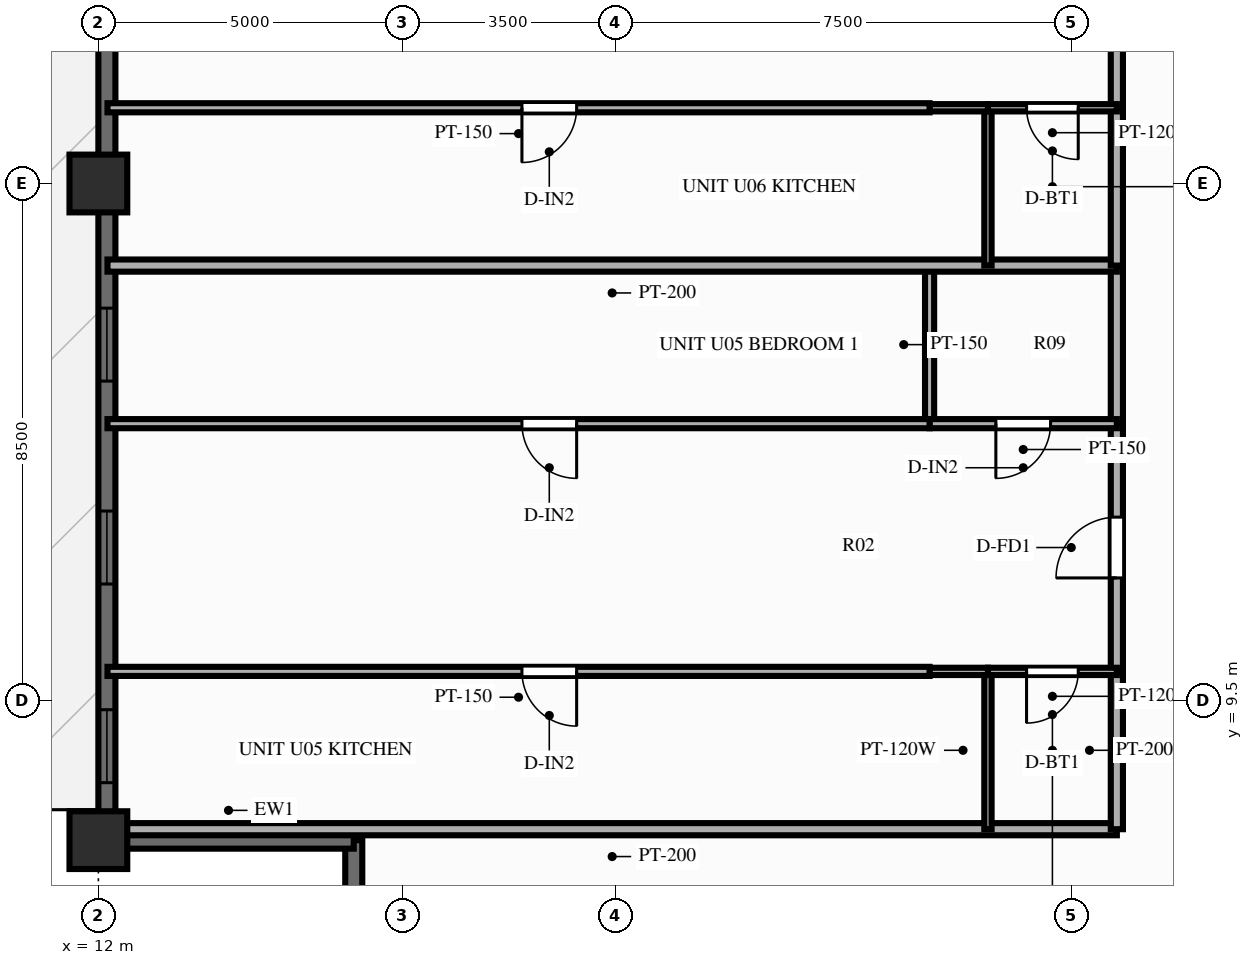
"""IFC4 building model, lengths in metres.
Left out: names, types, materials, properties, quantities, classifications, styles, units other than length and angle.
Written with IfcOpenShell. Run it as: python <this file> out.ifc"""

import sys

from ifc_helpers import new_model, si_unit, direction, frame, frame_2d, origin, origin_2d, place, context, subcontext, project, spatial, rectangle, extrude, source, transform, mapped, element, fill, save


model = new_model("IFC4")
c1 = context("Model", 3, precision=1e-05, world=origin(), true_north=direction((0.0, 1.0)))
c2 = subcontext(c1, "Body", "Model", "MODEL_VIEW")
j1 = project(units=[si_unit("LENGTHUNIT", "METRE"), si_unit("PLANEANGLEUNIT", "RADIAN")], contexts=[c1])
p1 = place(None, origin())
s1 = spatial("IfcSite", under=j1, at=p1, CompositionType="ELEMENT")
p2 = place(p1, origin())
s2 = spatial("IfcBuilding", under=s1, at=p2, CompositionType="ELEMENT")
p3 = place(p2, frame((0.0, 0.0, 119.85)))
s3 = spatial("IfcBuildingStorey", under=s2, at=p3, CompositionType="ELEMENT", Elevation=119.85)
m1 = source(origin(), c2, "Body", "SweptSolid", [
    extrude(rectangle(XDim=0.95, YDim=0.95, at=origin_2d()), origin(), (0.0, 0.0, 1.0), 3.0),
])
for number, where, z_axis, x_axis in (
    (1, (12.0, 18.0, 0.0), (0.0, 0.0, 1.0), (1.0, 0.0, 0.0)),
    (2, (12.0, 7.2, 0.0), (0.0, 0.0, 1.0), (1.0, 0.0, 0.0)),
):
    element("IfcColumn", number, at=place(p3, frame(where, z_axis=z_axis, x_axis=x_axis)), inside=s3, PredefinedType="COLUMN", context=c2, shape_type="MappedRepresentation", body=[
        mapped(m1, transform((0.0, 0.0, 0.0), scale=1.0)),
    ])
p4 = place(p3, frame((12.14, 7.2, 0.0), z_axis=(0.0, 0.0, 1.0), x_axis=(0.0, 1.0, 0.0)))
e3 = element("IfcWall", 3, at=p4, inside=s3, PredefinedType="SOLIDWALL", context=c2, shape_type="SweptSolid", body=[
    extrude(rectangle(XDim=39.6, YDim=0.28, at=frame_2d((19.8, 0.0))), origin(), (0.0, 0.0, 1.0), 2.28),
])
p5 = place(p4, frame((0.945, 0.0, 0.25)))
e4 = element("IfcOpeningElement", 4, at=p5, cuts=e3, PredefinedType="OPENING", context=c2, shape_type="SweptSolid", body=[
    extrude(rectangle(XDim=1.2, YDim=1.5, at=frame_2d((0.6, 0.75))), frame((0.0, 0.152, 0.0), z_axis=(0.0, -1.0, 0.0), x_axis=(1.0, 0.0, 0.0)), (0.0, 0.0, 1.0), 0.304),
])
p6 = place(p4, frame((4.213, 0.0, 0.25)))
e5 = element("IfcOpeningElement", 5, at=p6, cuts=e3, PredefinedType="OPENING", context=c2, shape_type="SweptSolid", body=[
    extrude(rectangle(XDim=1.2, YDim=1.5, at=frame_2d((0.6, 0.75))), frame((0.0, 0.152, 0.0), z_axis=(0.0, -1.0, 0.0), x_axis=(1.0, 0.0, 0.0)), (0.0, 0.0, 1.0), 0.304),
])
p7 = place(p4, frame((7.55, 0.0, 0.25)))
e6 = element("IfcOpeningElement", 6, at=p7, cuts=e3, PredefinedType="OPENING", context=c2, shape_type="SweptSolid", body=[
    extrude(rectangle(XDim=1.2, YDim=1.5, at=frame_2d((0.6, 0.75))), frame((0.0, 0.152, 0.0), z_axis=(0.0, -1.0, 0.0), x_axis=(1.0, 0.0, 0.0)), (0.0, 0.0, 1.0), 0.304),
])
p8 = place(p4, frame((13.483, 0.0, 0.25)))
e7 = element("IfcOpeningElement", 7, at=p8, cuts=e3, PredefinedType="OPENING", context=c2, shape_type="SweptSolid", body=[
    extrude(rectangle(XDim=1.2, YDim=1.5, at=frame_2d((0.6, 0.75))), frame((0.0, 0.152, 0.0), z_axis=(0.0, -1.0, 0.0), x_axis=(1.0, 0.0, 0.0)), (0.0, 0.0, 1.0), 0.304),
])
p9 = place(p4, frame((16.82, 0.0, 0.25)))
e8 = element("IfcOpeningElement", 8, at=p9, cuts=e3, PredefinedType="OPENING", context=c2, shape_type="SweptSolid", body=[
    extrude(rectangle(XDim=1.2, YDim=1.5, at=frame_2d((0.6, 0.75))), frame((0.0, 0.152, 0.0), z_axis=(0.0, -1.0, 0.0), x_axis=(1.0, 0.0, 0.0)), (0.0, 0.0, 1.0), 0.304),
])
p10 = place(p4, frame((19.2, 0.0, 0.25)))
e9 = element("IfcOpeningElement", 9, at=p10, cuts=e3, PredefinedType="OPENING", context=c2, shape_type="SweptSolid", body=[
    extrude(rectangle(XDim=1.2, YDim=1.5, at=frame_2d((0.6, 0.75))), frame((0.0, 0.152, 0.0), z_axis=(0.0, -1.0, 0.0), x_axis=(1.0, 0.0, 0.0)), (0.0, 0.0, 1.0), 0.304),
])
p11 = place(p4, frame((21.992, 0.0, 0.0)))
e10 = element("IfcOpeningElement", 10, at=p11, cuts=e3, PredefinedType="OPENING", context=c2, shape_type="SweptSolid", body=[
    extrude(rectangle(XDim=1.6, YDim=2.15, at=frame_2d((0.8, 1.075))), frame((0.0, 0.152, 0.0), z_axis=(0.0, -1.0, 0.0), x_axis=(1.0, 0.0, 0.0)), (0.0, 0.0, 1.0), 0.304),
])
p12 = place(p4, frame((25.529, 0.0, 0.25)))
e11 = element("IfcOpeningElement", 11, at=p12, cuts=e3, PredefinedType="OPENING", context=c2, shape_type="SweptSolid", body=[
    extrude(rectangle(XDim=1.2, YDim=1.5, at=frame_2d((0.6, 0.75))), frame((0.0, 0.152, 0.0), z_axis=(0.0, -1.0, 0.0), x_axis=(1.0, 0.0, 0.0)), (0.0, 0.0, 1.0), 0.304),
])
p13 = place(p4, frame((29.349, 0.0, 0.25)))
e12 = element("IfcOpeningElement", 12, at=p13, cuts=e3, PredefinedType="OPENING", context=c2, shape_type="SweptSolid", body=[
    extrude(rectangle(XDim=0.7, YDim=1.5, at=frame_2d((0.35, 0.75))), frame((0.0, 0.152, 0.0), z_axis=(0.0, -1.0, 0.0), x_axis=(1.0, 0.0, 0.0)), (0.0, 0.0, 1.0), 0.304),
])
p14 = place(p4, frame((31.285, 0.0, 0.25)))
e13 = element("IfcOpeningElement", 13, at=p14, cuts=e3, PredefinedType="OPENING", context=c2, shape_type="SweptSolid", body=[
    extrude(rectangle(XDim=1.2, YDim=1.5, at=frame_2d((0.6, 0.75))), frame((0.0, 0.152, 0.0), z_axis=(0.0, -1.0, 0.0), x_axis=(1.0, 0.0, 0.0)), (0.0, 0.0, 1.0), 0.304),
])
p15 = place(p4, frame((34.252, 0.0, 0.25)))
e14 = element("IfcOpeningElement", 14, at=p15, cuts=e3, PredefinedType="OPENING", context=c2, shape_type="SweptSolid", body=[
    extrude(rectangle(XDim=1.2, YDim=1.5, at=frame_2d((0.6, 0.75))), frame((0.0, 0.152, 0.0), z_axis=(0.0, -1.0, 0.0), x_axis=(1.0, 0.0, 0.0)), (0.0, 0.0, 1.0), 0.304),
])
p16 = place(p4, frame((37.151, 0.0, 0.25)))
e15 = element("IfcOpeningElement", 15, at=p16, cuts=e3, PredefinedType="OPENING", context=c2, shape_type="SweptSolid", body=[
    extrude(rectangle(XDim=1.2, YDim=1.5, at=frame_2d((0.6, 0.75))), frame((0.0, 0.152, 0.0), z_axis=(0.0, -1.0, 0.0), x_axis=(1.0, 0.0, 0.0)), (0.0, 0.0, 1.0), 0.304),
])
for number, where, z_axis, x_axis in (
    (16, (16.2, 3.08, 0.0), (0.0, 0.0, 1.0), (0.0, 1.0, 0.0)),
    (17, (12.08, 7.2, 0.0), (0.0, 0.0, 1.0), (1.0, 0.0, 0.0)),
):
    element("IfcWall", number, at=place(p3, frame(where, z_axis=z_axis, x_axis=x_axis)), inside=s3, PredefinedType="SOLIDWALL", context=c2, shape_type="SweptSolid", body=[
        extrude(rectangle(XDim=4.12, YDim=0.28, at=frame_2d((2.06, 0.0))), origin(), (0.0, 0.0, 1.0), 2.28),
    ])
p17 = place(p3, frame((28.75, 7.38, 0.0), z_axis=(0.0, 0.0, 1.0), x_axis=(-1.0, 0.0, 0.0)))
e18 = element("IfcWall", 18, at=p17, inside=s3, PredefinedType="PARTITIONING", context=c2, shape_type="SweptSolid", body=[
    extrude(rectangle(XDim=16.6, YDim=0.2, at=frame_2d((8.3, 0.0))), origin(), (0.0, 0.0, 1.0), 2.79),
])
p18 = place(p3, frame((28.75, 7.38, 0.0), z_axis=(0.0, 0.0, 1.0), x_axis=(0.0, 1.0, 0.0)))
e19 = element("IfcWall", 19, at=p18, inside=s3, PredefinedType="PARTITIONING", context=c2, shape_type="SweptSolid", body=[
    extrude(rectangle(XDim=2.596, YDim=0.2, at=frame_2d((1.298, 0.0))), origin(), (0.0, 0.0, 1.0), 2.79),
])
p19 = place(p3, frame((28.75, 9.976, 0.0), z_axis=(0.0, 0.0, 1.0), x_axis=(0.0, 1.0, 0.0)))
e20 = element("IfcWall", 20, at=p19, inside=s3, PredefinedType="PARTITIONING", context=c2, shape_type="SweptSolid", body=[
    extrude(rectangle(XDim=4.074, YDim=0.2, at=frame_2d((2.037, 0.0))), origin(), (0.0, 0.0, 1.0), 2.79),
])
p20 = place(p19, frame((1.537, 0.0, 0.0)))
e21 = element("IfcOpeningElement", 21, at=p20, cuts=e20, PredefinedType="OPENING", context=c2, shape_type="SweptSolid", body=[
    extrude(rectangle(XDim=1.0, YDim=2.15, at=frame_2d((0.5, 1.075))), frame((0.0, 0.112, 0.0), z_axis=(0.0, -1.0, 0.0), x_axis=(1.0, 0.0, 0.0)), (0.0, 0.0, 1.0), 0.224),
])
p21 = place(p3, frame((28.75, 14.05, 0.0), z_axis=(0.0, 0.0, 1.0), x_axis=(0.0, 1.0, 0.0)))
e22 = element("IfcWall", 22, at=p21, inside=s3, PredefinedType="PARTITIONING", context=c2, shape_type="SweptSolid", body=[
    extrude(rectangle(XDim=2.6, YDim=0.2, at=frame_2d((1.3, 0.0))), origin(), (0.0, 0.0, 1.0), 2.79),
])
p22 = place(p3, frame((26.63, 7.38, 0.0), z_axis=(0.0, 0.0, 1.0), x_axis=(0.0, 1.0, 0.0)))
e23 = element("IfcWall", 23, at=p22, inside=s3, PredefinedType="PARTITIONING", context=c2, shape_type="SweptSolid", body=[
    extrude(rectangle(XDim=2.596, YDim=0.12, at=frame_2d((1.298, 0.0))), origin(), (0.0, 0.0, 1.0), 2.79),
])
p23 = place(p3, frame((25.67, 14.05, 0.0), z_axis=(0.0, 0.0, 1.0), x_axis=(0.0, 1.0, 0.0)))
e24 = element("IfcWall", 24, at=p23, inside=s3, PredefinedType="PARTITIONING", context=c2, shape_type="SweptSolid", body=[
    extrude(rectangle(XDim=2.6, YDim=0.15, at=frame_2d((1.3, 0.0))), origin(), (0.0, 0.0, 1.0), 2.79),
])
p24 = place(p3, frame((28.75, 9.976, 0.0), z_axis=(0.0, 0.0, 1.0), x_axis=(-1.0, 0.0, 0.0)))
e25 = element("IfcWall", 25, at=p24, inside=s3, PredefinedType="PARTITIONING", context=c2, shape_type="SweptSolid", body=[
    extrude(rectangle(XDim=2.12, YDim=0.12, at=frame_2d((1.06, 0.0))), origin(), (0.0, 0.0, 1.0), 2.79),
])
p25 = place(p24, frame((0.635, 0.0, 0.0)))
e26 = element("IfcOpeningElement", 26, at=p25, cuts=e25, PredefinedType="OPENING", context=c2, shape_type="SweptSolid", body=[
    extrude(rectangle(XDim=0.85, YDim=2.05, at=frame_2d((0.425, 1.025))), frame((0.0, 0.072, 0.0), z_axis=(0.0, -1.0, 0.0), x_axis=(1.0, 0.0, 0.0)), (0.0, 0.0, 1.0), 0.144),
])
p26 = place(p3, frame((26.63, 9.976, 0.0), z_axis=(0.0, 0.0, 1.0), x_axis=(-1.0, 0.0, 0.0)))
e27 = element("IfcWall", 27, at=p26, inside=s3, PredefinedType="PARTITIONING", context=c2, shape_type="SweptSolid", body=[
    extrude(rectangle(XDim=0.96, YDim=0.12, at=frame_2d((0.48, 0.0))), origin(), (0.0, 0.0, 1.0), 2.79),
])
p27 = place(p3, frame((25.67, 9.976, 0.0), z_axis=(0.0, 0.0, 1.0), x_axis=(-1.0, 0.0, 0.0)))
e28 = element("IfcWall", 28, at=p27, inside=s3, PredefinedType="PARTITIONING", context=c2, shape_type="SweptSolid", body=[
    extrude(rectangle(XDim=13.52, YDim=0.15, at=frame_2d((6.76, 0.0))), origin(), (0.0, 0.0, 1.0), 2.79),
])
p28 = place(p27, frame((5.804, 0.0, 0.0)))
e29 = element("IfcOpeningElement", 29, at=p28, cuts=e28, PredefinedType="OPENING", context=c2, shape_type="SweptSolid", body=[
    extrude(rectangle(XDim=0.9, YDim=2.1, at=frame_2d((0.45, 1.05))), frame((0.0, 0.087, 0.0), z_axis=(0.0, -1.0, 0.0), x_axis=(1.0, 0.0, 0.0)), (0.0, 0.0, 1.0), 0.174),
])
p29 = place(p3, frame((28.75, 14.05, 0.0), z_axis=(0.0, 0.0, 1.0), x_axis=(-1.0, 0.0, 0.0)))
e30 = element("IfcWall", 30, at=p29, inside=s3, PredefinedType="PARTITIONING", context=c2, shape_type="SweptSolid", body=[
    extrude(rectangle(XDim=3.08, YDim=0.15, at=frame_2d((1.54, 0.0))), origin(), (0.0, 0.0, 1.0), 2.79),
])
p30 = place(p29, frame((1.09, 0.0, 0.0)))
e31 = element("IfcOpeningElement", 31, at=p30, cuts=e30, PredefinedType="OPENING", context=c2, shape_type="SweptSolid", body=[
    extrude(rectangle(XDim=0.9, YDim=2.1, at=frame_2d((0.45, 1.05))), frame((0.0, 0.087, 0.0), z_axis=(0.0, -1.0, 0.0), x_axis=(1.0, 0.0, 0.0)), (0.0, 0.0, 1.0), 0.174),
])
p31 = place(p3, frame((25.67, 14.05, 0.0), z_axis=(0.0, 0.0, 1.0), x_axis=(-1.0, 0.0, 0.0)))
e32 = element("IfcWall", 32, at=p31, inside=s3, PredefinedType="PARTITIONING", context=c2, shape_type="SweptSolid", body=[
    extrude(rectangle(XDim=13.52, YDim=0.15, at=frame_2d((6.76, 0.0))), origin(), (0.0, 0.0, 1.0), 2.79),
])
p32 = place(p31, frame((5.804, 0.0, 0.0)))
e33 = element("IfcOpeningElement", 33, at=p32, cuts=e32, PredefinedType="OPENING", context=c2, shape_type="SweptSolid", body=[
    extrude(rectangle(XDim=0.9, YDim=2.1, at=frame_2d((0.45, 1.05))), frame((0.0, 0.087, 0.0), z_axis=(0.0, -1.0, 0.0), x_axis=(1.0, 0.0, 0.0)), (0.0, 0.0, 1.0), 0.174),
])
p33 = place(p3, frame((28.75, 16.65, 0.0), z_axis=(0.0, 0.0, 1.0), x_axis=(-1.0, 0.0, 0.0)))
e34 = element("IfcWall", 34, at=p33, inside=s3, PredefinedType="PARTITIONING", context=c2, shape_type="SweptSolid", body=[
    extrude(rectangle(XDim=16.6, YDim=0.2, at=frame_2d((8.3, 0.0))), origin(), (0.0, 0.0, 1.0), 2.79),
])
p34 = place(p3, frame((28.75, 16.65, 0.0), z_axis=(0.0, 0.0, 1.0), x_axis=(0.0, 1.0, 0.0)))
e35 = element("IfcWall", 35, at=p34, inside=s3, PredefinedType="PARTITIONING", context=c2, shape_type="SweptSolid", body=[
    extrude(rectangle(XDim=2.596, YDim=0.2, at=frame_2d((1.298, 0.0))), origin(), (0.0, 0.0, 1.0), 2.79),
])
p35 = place(p3, frame((28.75, 19.246, 0.0), z_axis=(0.0, 0.0, 1.0), x_axis=(0.0, 1.0, 0.0)))
e36 = element("IfcWall", 36, at=p35, inside=s3, PredefinedType="PARTITIONING", context=c2, shape_type="SweptSolid", body=[
    extrude(rectangle(XDim=4.074, YDim=0.2, at=frame_2d((2.037, 0.0))), origin(), (0.0, 0.0, 1.0), 2.79),
])
p36 = place(p35, frame((1.537, 0.0, 0.0)))
e37 = element("IfcOpeningElement", 37, at=p36, cuts=e36, PredefinedType="OPENING", context=c2, shape_type="SweptSolid", body=[
    extrude(rectangle(XDim=1.0, YDim=2.15, at=frame_2d((0.5, 1.075))), frame((0.0, 0.112, 0.0), z_axis=(0.0, -1.0, 0.0), x_axis=(1.0, 0.0, 0.0)), (0.0, 0.0, 1.0), 0.224),
])
p37 = place(p3, frame((26.63, 16.65, 0.0), z_axis=(0.0, 0.0, 1.0), x_axis=(0.0, 1.0, 0.0)))
e38 = element("IfcWall", 38, at=p37, inside=s3, PredefinedType="PARTITIONING", context=c2, shape_type="SweptSolid", body=[
    extrude(rectangle(XDim=2.596, YDim=0.12, at=frame_2d((1.298, 0.0))), origin(), (0.0, 0.0, 1.0), 2.79),
])
p38 = place(p3, frame((28.75, 19.246, 0.0), z_axis=(0.0, 0.0, 1.0), x_axis=(-1.0, 0.0, 0.0)))
e39 = element("IfcWall", 39, at=p38, inside=s3, PredefinedType="PARTITIONING", context=c2, shape_type="SweptSolid", body=[
    extrude(rectangle(XDim=2.12, YDim=0.12, at=frame_2d((1.06, 0.0))), origin(), (0.0, 0.0, 1.0), 2.79),
])
p39 = place(p38, frame((0.635, 0.0, 0.0)))
e40 = element("IfcOpeningElement", 40, at=p39, cuts=e39, PredefinedType="OPENING", context=c2, shape_type="SweptSolid", body=[
    extrude(rectangle(XDim=0.85, YDim=2.05, at=frame_2d((0.425, 1.025))), frame((0.0, 0.072, 0.0), z_axis=(0.0, -1.0, 0.0), x_axis=(1.0, 0.0, 0.0)), (0.0, 0.0, 1.0), 0.144),
])
p40 = place(p3, frame((26.63, 19.246, 0.0), z_axis=(0.0, 0.0, 1.0), x_axis=(-1.0, 0.0, 0.0)))
e41 = element("IfcWall", 41, at=p40, inside=s3, PredefinedType="PARTITIONING", context=c2, shape_type="SweptSolid", body=[
    extrude(rectangle(XDim=0.96, YDim=0.12, at=frame_2d((0.48, 0.0))), origin(), (0.0, 0.0, 1.0), 2.79),
])
p41 = place(p3, frame((25.67, 19.246, 0.0), z_axis=(0.0, 0.0, 1.0), x_axis=(-1.0, 0.0, 0.0)))
e42 = element("IfcWall", 42, at=p41, inside=s3, PredefinedType="PARTITIONING", context=c2, shape_type="SweptSolid", body=[
    extrude(rectangle(XDim=13.52, YDim=0.15, at=frame_2d((6.76, 0.0))), origin(), (0.0, 0.0, 1.0), 2.79),
])
p42 = place(p41, frame((5.804, 0.0, 0.0)))
e43 = element("IfcOpeningElement", 43, at=p42, cuts=e42, PredefinedType="OPENING", context=c2, shape_type="SweptSolid", body=[
    extrude(rectangle(XDim=0.9, YDim=2.1, at=frame_2d((0.45, 1.05))), frame((0.0, 0.087, 0.0), z_axis=(0.0, -1.0, 0.0), x_axis=(1.0, 0.0, 0.0)), (0.0, 0.0, 1.0), 0.174),
])
m2 = source(origin(), c2, "Body", "SweptSolid", [
    extrude(rectangle(XDim=1.2, YDim=1.5, at=frame_2d((0.6, 0.75))), frame((0.0, 0.03, 0.0), z_axis=(0.0, -1.0, 0.0), x_axis=(1.0, 0.0, 0.0)), (0.0, 0.0, 1.0), 0.06),
])
p43 = place(p5, origin())
e44 = element("IfcWindow", 44, at=p43, inside=s3, PartitioningType="SINGLE_PANEL", PredefinedType="WINDOW", context=c2, shape_type="MappedRepresentation", body=[
    mapped(m2, transform((0.0, 0.0, 0.0), scale=1.0)),
])
fill(e4, e44)
p44 = place(p6, origin())
e45 = element("IfcWindow", 45, at=p44, inside=s3, PartitioningType="SINGLE_PANEL", PredefinedType="WINDOW", context=c2, shape_type="MappedRepresentation", body=[
    mapped(m2, transform((0.0, 0.0, 0.0), scale=1.0)),
])
fill(e5, e45)
p45 = place(p7, origin())
e46 = element("IfcWindow", 46, at=p45, inside=s3, PartitioningType="SINGLE_PANEL", PredefinedType="WINDOW", context=c2, shape_type="MappedRepresentation", body=[
    mapped(m2, transform((0.0, 0.0, 0.0), scale=1.0)),
])
fill(e6, e46)
m3 = source(origin(), c2, "Body", "SweptSolid", [
    extrude(rectangle(XDim=1.0, YDim=2.15, at=frame_2d((0.5, 1.075))), frame((0.0, 0.025, 0.0), z_axis=(0.0, -1.0, 0.0), x_axis=(1.0, 0.0, 0.0)), (0.0, 0.0, 1.0), 0.05),
])
p46 = place(p20, origin())
e47 = element("IfcDoor", 47, at=p46, inside=s3, OperationType="SINGLE_SWING_LEFT", PredefinedType="DOOR", context=c2, shape_type="MappedRepresentation", body=[
    mapped(m3, transform((0.0, 0.0, 0.0), scale=1.0)),
])
fill(e21, e47)
m4 = source(origin(), c2, "Body", "SweptSolid", [
    extrude(rectangle(XDim=0.85, YDim=2.05, at=frame_2d((0.425, 1.025))), frame((0.0, 0.025, 0.0), z_axis=(0.0, -1.0, 0.0), x_axis=(1.0, 0.0, 0.0)), (0.0, 0.0, 1.0), 0.05),
])
p47 = place(p25, origin())
e48 = element("IfcDoor", 48, at=p47, inside=s3, OperationType="SINGLE_SWING_RIGHT", PredefinedType="DOOR", context=c2, shape_type="MappedRepresentation", body=[
    mapped(m4, transform((0.0, 0.0, 0.0), scale=1.0)),
])
fill(e26, e48)
m5 = source(origin(), c2, "Body", "SweptSolid", [
    extrude(rectangle(XDim=0.9, YDim=2.1, at=frame_2d((0.45, 1.05))), frame((0.0, 0.025, 0.0), z_axis=(0.0, -1.0, 0.0), x_axis=(1.0, 0.0, 0.0)), (0.0, 0.0, 1.0), 0.05),
])
p48 = place(p28, origin())
e49 = element("IfcDoor", 49, at=p48, inside=s3, OperationType="SINGLE_SWING_LEFT", PredefinedType="DOOR", context=c2, shape_type="MappedRepresentation", body=[
    mapped(m5, transform((0.0, 0.0, 0.0), scale=1.0)),
])
fill(e29, e49)
p49 = place(p30, origin())
e50 = element("IfcDoor", 50, at=p49, inside=s3, OperationType="SINGLE_SWING_RIGHT", PredefinedType="DOOR", context=c2, shape_type="MappedRepresentation", body=[
    mapped(m5, transform((0.0, 0.0, 0.0), scale=1.0)),
])
fill(e31, e50)
p50 = place(p32, origin())
e51 = element("IfcDoor", 51, at=p50, inside=s3, OperationType="SINGLE_SWING_LEFT", PredefinedType="DOOR", context=c2, shape_type="MappedRepresentation", body=[
    mapped(m5, transform((0.0, 0.0, 0.0), scale=1.0)),
])
fill(e33, e51)
p51 = place(p39, origin())
e52 = element("IfcDoor", 52, at=p51, inside=s3, OperationType="SINGLE_SWING_LEFT", PredefinedType="DOOR", context=c2, shape_type="MappedRepresentation", body=[
    mapped(m4, transform((0.0, 0.0, 0.0), scale=1.0)),
])
fill(e40, e52)
p52 = place(p42, origin())
e53 = element("IfcDoor", 53, at=p52, inside=s3, OperationType="SINGLE_SWING_RIGHT", PredefinedType="DOOR", context=c2, shape_type="MappedRepresentation", body=[
    mapped(m5, transform((0.0, 0.0, 0.0), scale=1.0)),
])
fill(e43, e53)
save(model, sys.argv[1])
